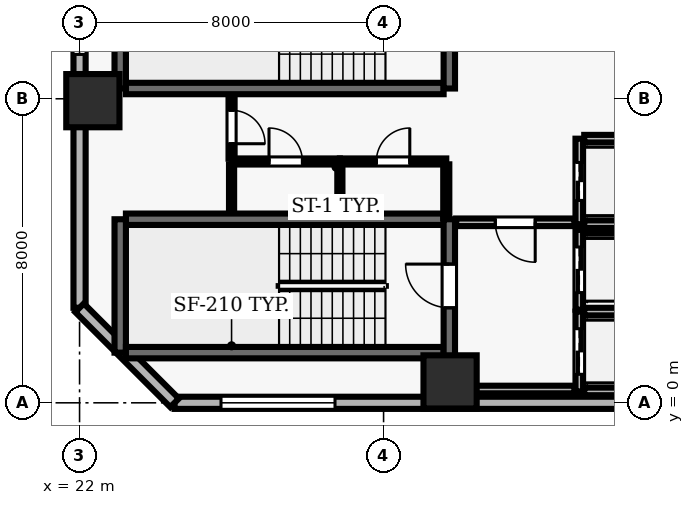
"""IFC4 building model, lengths in metres.
Left out: names, types, materials, properties, quantities, classifications, styles, units other than length and angle.
Written with IfcOpenShell. Run it as: python <this file> out.ifc"""

import sys

from ifc_helpers import new_model, si_unit, direction, frame, frame_2d, origin, origin_2d, place, context, subcontext, project, spatial, rectangle, extrude, element, fill, save


model = new_model("IFC4")
c1 = context("Model", 3, precision=1e-05, world=origin(), true_north=direction((0.0, 1.0)))
c2 = subcontext(c1, "Body", "Model", "MODEL_VIEW")
j1 = project(units=[si_unit("LENGTHUNIT", "METRE"), si_unit("PLANEANGLEUNIT", "RADIAN")], contexts=[c1])
p1 = place(None, origin())
s1 = spatial("IfcSite", under=j1, at=p1, CompositionType="ELEMENT")
p2 = place(p1, origin())
s2 = spatial("IfcBuilding", under=s1, at=p2, CompositionType="ELEMENT")
p3 = place(p2, frame((0.0, 0.0, 50.5)))
s3 = spatial("IfcBuildingStorey", under=s2, at=p3, CompositionType="ELEMENT", Elevation=50.5)
for number, where, z_axis, x_axis in (
    (1, (31.75, 0.55, 0.0), (0.0, 0.0, 1.0), (1.0, 0.0, 0.0)),
    (2, (22.35, 7.95, 0.0), (0.0, 0.0, 1.0), (1.0, 0.0, 0.0)),
):
    element("IfcColumn", number, at=place(p3, frame(where, z_axis=z_axis, x_axis=x_axis)), inside=s3, PredefinedType="COLUMN", context=c2, shape_type="SweptSolid", body=[
        extrude(rectangle(XDim=1.4, YDim=1.4, at=origin_2d()), origin(), (0.0, 0.0, 1.0), 3.9),
    ])
p4 = place(p3, frame((24.5, 0.0, 0.0), z_axis=(0.0, 0.0, 1.0), x_axis=(1.0, 0.0, 0.0)))
e3 = element("IfcWall", 3, at=p4, inside=s3, PredefinedType="SOLIDWALL", context=c2, shape_type="SweptSolid", body=[
    extrude(rectangle(XDim=49.0, YDim=0.32, at=frame_2d((24.5, 0.0))), origin(), (0.0, 0.0, 1.0), 3.69),
])
p5 = place(p4, frame((1.222, 0.0, 0.9)))
e4 = element("IfcOpeningElement", 4, at=p5, cuts=e3, PredefinedType="OPENING", context=c2, shape_type="SweptSolid", body=[
    extrude(rectangle(XDim=3.0, YDim=2.2, at=frame_2d((1.5, 1.1))), frame((0.0, 0.17, 0.0), z_axis=(0.0, -1.0, 0.0), x_axis=(1.0, 0.0, 0.0)), (0.0, 0.0, 1.0), 0.34),
])
p6 = place(p4, frame((17.556, 0.0, 0.9)))
e5 = element("IfcOpeningElement", 5, at=p6, cuts=e3, PredefinedType="OPENING", context=c2, shape_type="SweptSolid", body=[
    extrude(rectangle(XDim=3.0, YDim=2.2, at=frame_2d((1.5, 1.1))), frame((0.0, 0.17, 0.0), z_axis=(0.0, -1.0, 0.0), x_axis=(1.0, 0.0, 0.0)), (0.0, 0.0, 1.0), 0.34),
])
p7 = place(p4, frame((28.444, 0.0, 0.9)))
e6 = element("IfcOpeningElement", 6, at=p7, cuts=e3, PredefinedType="OPENING", context=c2, shape_type="SweptSolid", body=[
    extrude(rectangle(XDim=3.0, YDim=2.2, at=frame_2d((1.5, 1.1))), frame((0.0, 0.17, 0.0), z_axis=(0.0, -1.0, 0.0), x_axis=(1.0, 0.0, 0.0)), (0.0, 0.0, 1.0), 0.34),
])
p8 = place(p4, frame((39.333, 0.0, 0.9)))
e7 = element("IfcOpeningElement", 7, at=p8, cuts=e3, PredefinedType="OPENING", context=c2, shape_type="SweptSolid", body=[
    extrude(rectangle(XDim=3.0, YDim=2.2, at=frame_2d((1.5, 1.1))), frame((0.0, 0.17, 0.0), z_axis=(0.0, -1.0, 0.0), x_axis=(1.0, 0.0, 0.0)), (0.0, 0.0, 1.0), 0.34),
])
p9 = place(p4, frame((44.778, 0.0, 0.9)))
e8 = element("IfcOpeningElement", 8, at=p9, cuts=e3, PredefinedType="OPENING", context=c2, shape_type="SweptSolid", body=[
    extrude(rectangle(XDim=3.0, YDim=2.2, at=frame_2d((1.5, 1.1))), frame((0.0, 0.17, 0.0), z_axis=(0.0, -1.0, 0.0), x_axis=(1.0, 0.0, 0.0)), (0.0, 0.0, 1.0), 0.34),
])
p10 = place(p3, frame((22.0, 51.5, 0.0), z_axis=(0.0, 0.0, 1.0), x_axis=(0.0, -1.0, 0.0)))
e9 = element("IfcWall", 9, at=p10, inside=s3, PredefinedType="SOLIDWALL", context=c2, shape_type="SweptSolid", body=[
    extrude(rectangle(XDim=49.0, YDim=0.32, at=frame_2d((24.5, 0.0))), origin(), (0.0, 0.0, 1.0), 3.69),
])
p11 = place(p10, frame((17.8, 0.0, 0.0)))
e10 = element("IfcOpeningElement", 10, at=p11, cuts=e9, PredefinedType="OPENING", context=c2, shape_type="SweptSolid", body=[
    extrude(rectangle(XDim=1.0, YDim=2.2, at=frame_2d((0.5, 1.1))), frame((0.0, 0.17, 0.0), z_axis=(0.0, -1.0, 0.0), x_axis=(1.0, 0.0, 0.0)), (0.0, 0.0, 1.0), 0.34),
])
p12 = place(p10, frame((1.222, 0.0, 0.9)))
e11 = element("IfcOpeningElement", 11, at=p12, cuts=e9, PredefinedType="OPENING", context=c2, shape_type="SweptSolid", body=[
    extrude(rectangle(XDim=3.0, YDim=2.2, at=frame_2d((1.5, 1.1))), frame((0.0, 0.17, 0.0), z_axis=(0.0, -1.0, 0.0), x_axis=(1.0, 0.0, 0.0)), (0.0, 0.0, 1.0), 0.34),
])
p13 = place(p10, frame((6.667, 0.0, 0.9)))
e12 = element("IfcOpeningElement", 12, at=p13, cuts=e9, PredefinedType="OPENING", context=c2, shape_type="SweptSolid", body=[
    extrude(rectangle(XDim=3.0, YDim=2.2, at=frame_2d((1.5, 1.1))), frame((0.0, 0.17, 0.0), z_axis=(0.0, -1.0, 0.0), x_axis=(1.0, 0.0, 0.0)), (0.0, 0.0, 1.0), 0.34),
])
p14 = place(p10, frame((39.333, 0.0, 0.9)))
e13 = element("IfcOpeningElement", 13, at=p14, cuts=e9, PredefinedType="OPENING", context=c2, shape_type="SweptSolid", body=[
    extrude(rectangle(XDim=3.0, YDim=2.2, at=frame_2d((1.5, 1.1))), frame((0.0, 0.17, 0.0), z_axis=(0.0, -1.0, 0.0), x_axis=(1.0, 0.0, 0.0)), (0.0, 0.0, 1.0), 0.34),
])
p15 = place(p3, frame((22.0, 2.5, 0.0), z_axis=(0.0, 0.0, 1.0), x_axis=(0.707106781187, -0.707106781187, 0.0)))
e14 = element("IfcWall", 14, at=p15, inside=s3, PredefinedType="SOLIDWALL", context=c2, shape_type="SweptSolid", body=[
    extrude(rectangle(XDim=3.536, YDim=0.32, at=frame_2d((1.768, 0.0))), origin(), (0.0, 0.0, 1.0), 3.69),
])
p16 = place(p3, frame((31.58, 4.83, 0.0), z_axis=(0.0, 0.0, 1.0), x_axis=(-1.0, 0.0, 0.0)))
e15 = element("IfcWall", 15, at=p16, inside=s3, PredefinedType="SHEAR", context=c2, shape_type="SweptSolid", body=[
    extrude(rectangle(XDim=8.36, YDim=0.3, at=frame_2d((4.18, 0.0))), origin(), (0.0, 0.0, 1.0), 3.69),
])
p17 = place(p3, frame((23.07, 4.83, 0.0), z_axis=(0.0, 0.0, 1.0), x_axis=(0.0, -1.0, 0.0)))
e16 = element("IfcWall", 16, at=p17, inside=s3, PredefinedType="SHEAR", context=c2, shape_type="SweptSolid", body=[
    extrude(rectangle(XDim=3.51, YDim=0.3, at=frame_2d((1.755, 0.0))), origin(), (0.0, 0.0, 1.0), 3.69),
])
p18 = place(p3, frame((23.22, 1.32, 0.0), z_axis=(0.0, 0.0, 1.0), x_axis=(1.0, 0.0, 0.0)))
e17 = element("IfcWall", 17, at=p18, inside=s3, PredefinedType="SHEAR", context=c2, shape_type="SweptSolid", body=[
    extrude(rectangle(XDim=8.36, YDim=0.3, at=frame_2d((4.18, 0.0))), origin(), (0.0, 0.0, 1.0), 3.69),
])
p19 = place(p3, frame((31.73, 0.96, 0.0), z_axis=(0.0, 0.0, 1.0), x_axis=(0.0, 1.0, 0.0)))
e18 = element("IfcWall", 18, at=p19, inside=s3, PredefinedType="SHEAR", context=c2, shape_type="SweptSolid", body=[
    extrude(rectangle(XDim=3.87, YDim=0.3, at=frame_2d((1.935, 0.0))), origin(), (0.0, 0.0, 1.0), 3.69),
])
p20 = place(p19, frame((1.54, 0.0, 0.0)))
e19 = element("IfcOpeningElement", 19, at=p20, cuts=e18, PredefinedType="OPENING", context=c2, shape_type="SweptSolid", body=[
    extrude(rectangle(XDim=1.15, YDim=2.15, at=frame_2d((0.575, 1.075))), frame((0.0, 0.16, 0.0), z_axis=(0.0, -1.0, 0.0), x_axis=(1.0, 0.0, 0.0)), (0.0, 0.0, 1.0), 0.32),
])
p21 = place(p3, frame((23.07, 11.78, 0.0), z_axis=(0.0, 0.0, 1.0), x_axis=(0.0, -1.0, 0.0)))
e20 = element("IfcWall", 20, at=p21, inside=s3, PredefinedType="SHEAR", context=c2, shape_type="SweptSolid", body=[
    extrude(rectangle(XDim=3.51, YDim=0.3, at=frame_2d((1.755, 0.0))), origin(), (0.0, 0.0, 1.0), 3.69),
])
p22 = place(p3, frame((23.22, 8.27, 0.0), z_axis=(0.0, 0.0, 1.0), x_axis=(1.0, 0.0, 0.0)))
e21 = element("IfcWall", 21, at=p22, inside=s3, PredefinedType="SHEAR", context=c2, shape_type="SweptSolid", body=[
    extrude(rectangle(XDim=8.36, YDim=0.3, at=frame_2d((4.18, 0.0))), origin(), (0.0, 0.0, 1.0), 3.69),
])
p23 = place(p3, frame((31.73, 8.27, 0.0), z_axis=(0.0, 0.0, 1.0), x_axis=(0.0, 1.0, 0.0)))
e22 = element("IfcWall", 22, at=p23, inside=s3, PredefinedType="SHEAR", context=c2, shape_type="SweptSolid", body=[
    extrude(rectangle(XDim=3.51, YDim=0.3, at=frame_2d((1.755, 0.0))), origin(), (0.0, 0.0, 1.0), 3.69),
])
p24 = place(p23, frame((1.18, 0.0, 0.0)))
e23 = element("IfcOpeningElement", 23, at=p24, cuts=e22, PredefinedType="OPENING", context=c2, shape_type="SweptSolid", body=[
    extrude(rectangle(XDim=1.15, YDim=2.15, at=frame_2d((0.575, 1.075))), frame((0.0, 0.16, 0.0), z_axis=(0.0, -1.0, 0.0), x_axis=(1.0, 0.0, 0.0)), (0.0, 0.0, 1.0), 0.32),
])
p25 = place(p3, frame((35.15, 2.4, 0.0), z_axis=(0.0, 0.0, 1.0), x_axis=(0.0, -1.0, 0.0)))
e24 = element("IfcWall", 24, at=p25, inside=s3, PredefinedType="SOLIDWALL", context=c2, shape_type="SweptSolid", body=[
    extrude(rectangle(XDim=2.1, YDim=0.2, at=frame_2d((1.05, 0.0))), origin(), (0.0, 0.0, 1.0), 3.69),
])
p26 = place(p25, frame((0.45, 0.0, 0.0)))
e25 = element("IfcOpeningElement", 25, at=p26, cuts=e24, PredefinedType="OPENING", context=c2, shape_type="SweptSolid", body=[
    extrude(rectangle(XDim=1.2, YDim=2.15, at=frame_2d((0.6, 1.075))), frame((0.0, 0.11, 0.0), z_axis=(0.0, -1.0, 0.0), x_axis=(1.0, 0.0, 0.0)), (0.0, 0.0, 1.0), 0.22),
])
for number, where, z_axis, x_axis in (
    (26, (35.28, 0.3, 0.0), (0.0, 0.0, 1.0), (1.0, 0.0, 0.0)),
    (27, (37.42, 2.4, 0.0), (0.0, 0.0, 1.0), (-1.0, 0.0, 0.0)),
):
    element("IfcWall", number, at=place(p3, frame(where, z_axis=z_axis, x_axis=x_axis)), inside=s3, PredefinedType="SOLIDWALL", context=c2, shape_type="SweptSolid", body=[
        extrude(rectangle(XDim=2.14, YDim=0.2, at=frame_2d((1.07, 0.0))), origin(), (0.0, 0.0, 1.0), 3.69),
    ])
p27 = place(p3, frame((35.15, 4.55, 0.0), z_axis=(0.0, 0.0, 1.0), x_axis=(0.0, -1.0, 0.0)))
e28 = element("IfcWall", 28, at=p27, inside=s3, PredefinedType="SOLIDWALL", context=c2, shape_type="SweptSolid", body=[
    extrude(rectangle(XDim=2.1, YDim=0.2, at=frame_2d((1.05, 0.0))), origin(), (0.0, 0.0, 1.0), 3.69),
])
p28 = place(p27, frame((0.45, 0.0, 0.0)))
e29 = element("IfcOpeningElement", 29, at=p28, cuts=e28, PredefinedType="OPENING", context=c2, shape_type="SweptSolid", body=[
    extrude(rectangle(XDim=1.2, YDim=2.15, at=frame_2d((0.6, 1.075))), frame((0.0, 0.11, 0.0), z_axis=(0.0, -1.0, 0.0), x_axis=(1.0, 0.0, 0.0)), (0.0, 0.0, 1.0), 0.22),
])
p29 = place(p3, frame((37.42, 4.55, 0.0), z_axis=(0.0, 0.0, 1.0), x_axis=(-1.0, 0.0, 0.0)))
e30 = element("IfcWall", 30, at=p29, inside=s3, PredefinedType="SOLIDWALL", context=c2, shape_type="SweptSolid", body=[
    extrude(rectangle(XDim=2.14, YDim=0.2, at=frame_2d((1.07, 0.0))), origin(), (0.0, 0.0, 1.0), 3.69),
])
p30 = place(p3, frame((35.15, 6.95, 0.0), z_axis=(0.0, 0.0, 1.0), x_axis=(0.0, -1.0, 0.0)))
e31 = element("IfcWall", 31, at=p30, inside=s3, PredefinedType="SOLIDWALL", context=c2, shape_type="SweptSolid", body=[
    extrude(rectangle(XDim=2.25, YDim=0.2, at=frame_2d((1.125, 0.0))), origin(), (0.0, 0.0, 1.0), 3.69),
])
p31 = place(p30, frame((0.625, 0.0, 0.0)))
e32 = element("IfcOpeningElement", 32, at=p31, cuts=e31, PredefinedType="OPENING", context=c2, shape_type="SweptSolid", body=[
    extrude(rectangle(XDim=1.0, YDim=2.1, at=frame_2d((0.5, 1.05))), frame((0.0, 0.11, 0.0), z_axis=(0.0, -1.0, 0.0), x_axis=(1.0, 0.0, 0.0)), (0.0, 0.0, 1.0), 0.22),
])
for number, where, z_axis, x_axis in (
    (33, (35.28, 4.7, 0.0), (0.0, 0.0, 1.0), (1.0, 0.0, 0.0)),
    (34, (37.42, 6.95, 0.0), (0.0, 0.0, 1.0), (-1.0, 0.0, 0.0)),
):
    element("IfcWall", number, at=place(p3, frame(where, z_axis=z_axis, x_axis=x_axis)), inside=s3, PredefinedType="SOLIDWALL", context=c2, shape_type="SweptSolid", body=[
        extrude(rectangle(XDim=2.14, YDim=0.2, at=frame_2d((1.07, 0.0))), origin(), (0.0, 0.0, 1.0), 3.69),
    ])
p32 = place(p3, frame((26.0, 6.35, 0.0), z_axis=(0.0, 0.0, 1.0), x_axis=(1.0, 0.0, 0.0)))
e35 = element("IfcWall", 35, at=p32, inside=s3, PredefinedType="PARTITIONING", context=c2, shape_type="SweptSolid", body=[
    extrude(rectangle(XDim=2.85, YDim=0.16, at=frame_2d((1.425, 0.0))), origin(), (0.0, 0.0, 1.0), 3.69),
])
p33 = place(p32, frame((0.985, 0.0, 0.0)))
e36 = element("IfcOpeningElement", 36, at=p33, cuts=e35, PredefinedType="OPENING", context=c2, shape_type="SweptSolid", body=[
    extrude(rectangle(XDim=0.88, YDim=2.1, at=frame_2d((0.44, 1.05))), frame((0.0, 0.09, 0.0), z_axis=(0.0, -1.0, 0.0), x_axis=(1.0, 0.0, 0.0)), (0.0, 0.0, 1.0), 0.18),
])
p34 = place(p3, frame((28.85, 6.35, 0.0), z_axis=(0.0, 0.0, 1.0), x_axis=(1.0, 0.0, 0.0)))
e37 = element("IfcWall", 37, at=p34, inside=s3, PredefinedType="PARTITIONING", context=c2, shape_type="SweptSolid", body=[
    extrude(rectangle(XDim=2.8, YDim=0.16, at=frame_2d((1.4, 0.0))), origin(), (0.0, 0.0, 1.0), 3.69),
])
p35 = place(p34, frame((0.96, 0.0, 0.0)))
e38 = element("IfcOpeningElement", 38, at=p35, cuts=e37, PredefinedType="OPENING", context=c2, shape_type="SweptSolid", body=[
    extrude(rectangle(XDim=0.88, YDim=2.1, at=frame_2d((0.44, 1.05))), frame((0.0, 0.09, 0.0), z_axis=(0.0, -1.0, 0.0), x_axis=(1.0, 0.0, 0.0)), (0.0, 0.0, 1.0), 0.18),
])
p36 = place(p3, frame((31.65, 0.35, 0.0), z_axis=(0.0, 0.0, 1.0), x_axis=(1.0, 0.0, 0.0)))
e39 = element("IfcWall", 39, at=p36, inside=s3, PredefinedType="SOLIDWALL", context=c2, shape_type="SweptSolid", body=[
    extrude(rectangle(XDim=3.37, YDim=0.2, at=frame_2d((1.685, 0.0))), origin(), (0.0, 0.0, 1.0), 3.69),
])
p37 = place(p3, frame((35.02, 4.75, 0.0), z_axis=(0.0, 0.0, 1.0), x_axis=(-1.0, 0.0, 0.0)))
e40 = element("IfcWall", 40, at=p37, inside=s3, PredefinedType="SOLIDWALL", context=c2, shape_type="SweptSolid", body=[
    extrude(rectangle(XDim=3.11, YDim=0.2, at=frame_2d((1.555, 0.0))), origin(), (0.0, 0.0, 1.0), 3.69),
])
p38 = place(p37, frame((1.03, 0.0, 0.0)))
e41 = element("IfcOpeningElement", 41, at=p38, cuts=e40, PredefinedType="OPENING", context=c2, shape_type="SweptSolid", body=[
    extrude(rectangle(XDim=1.05, YDim=2.15, at=frame_2d((0.525, 1.075))), frame((0.0, 0.11, 0.0), z_axis=(0.0, -1.0, 0.0), x_axis=(1.0, 0.0, 0.0)), (0.0, 0.0, 1.0), 0.22),
])
p39 = place(p3, frame((26.0, 5.01, 0.0), z_axis=(0.0, 0.0, 1.0), x_axis=(0.0, 1.0, 0.0)))
e42 = element("IfcWall", 42, at=p39, inside=s3, PredefinedType="PARTITIONING", context=c2, shape_type="SweptSolid", body=[
    extrude(rectangle(XDim=1.265, YDim=0.135, at=frame_2d((0.632, 0.0))), origin(), (0.0, 0.0, 1.0), 3.69),
])
p40 = place(p3, frame((26.0, 8.09, 0.0), z_axis=(0.0, 0.0, 1.0), x_axis=(0.0, -1.0, 0.0)))
e43 = element("IfcWall", 43, at=p40, inside=s3, PredefinedType="PARTITIONING", context=c2, shape_type="SweptSolid", body=[
    extrude(rectangle(XDim=1.665, YDim=0.16, at=frame_2d((0.833, 0.0))), origin(), (0.0, 0.0, 1.0), 3.69),
])
p41 = place(p40, frame((0.393, 0.0, 0.0)))
e44 = element("IfcOpeningElement", 44, at=p41, cuts=e43, PredefinedType="OPENING", context=c2, shape_type="SweptSolid", body=[
    extrude(rectangle(XDim=0.88, YDim=2.1, at=frame_2d((0.44, 1.05))), frame((0.0, 0.09, 0.0), z_axis=(0.0, -1.0, 0.0), x_axis=(1.0, 0.0, 0.0)), (0.0, 0.0, 1.0), 0.18),
])
p42 = place(p3, frame((28.85, 5.01, 0.0), z_axis=(0.0, 0.0, 1.0), x_axis=(0.0, 1.0, 0.0)))
e45 = element("IfcWall", 45, at=p42, inside=s3, PredefinedType="PARTITIONING", context=c2, shape_type="SweptSolid", body=[
    extrude(rectangle(XDim=1.265, YDim=0.135, at=frame_2d((0.632, 0.0))), origin(), (0.0, 0.0, 1.0), 3.69),
])
p43 = place(p3, frame((31.65, 4.86, 0.0), z_axis=(0.0, 0.0, 1.0), x_axis=(0.0, 1.0, 0.0)))
e46 = element("IfcWall", 46, at=p43, inside=s3, PredefinedType="PARTITIONING", context=c2, shape_type="SweptSolid", body=[
    extrude(rectangle(XDim=1.415, YDim=0.16, at=frame_2d((0.708, 0.0))), origin(), (0.0, 0.0, 1.0), 3.69),
])
p44 = place(p5, origin())
e47 = element("IfcWindow", 47, at=p44, inside=s3, PartitioningType="SINGLE_PANEL", PredefinedType="WINDOW", context=c2, shape_type="SweptSolid", body=[
    extrude(rectangle(XDim=3.0, YDim=2.2, at=frame_2d((1.5, 1.1))), frame((0.0, 0.03, 0.0), z_axis=(0.0, -1.0, 0.0), x_axis=(1.0, 0.0, 0.0)), (0.0, 0.0, 1.0), 0.06),
])
fill(e4, e47)
p45 = place(p14, origin())
e48 = element("IfcWindow", 48, at=p45, inside=s3, PartitioningType="SINGLE_PANEL", PredefinedType="WINDOW", context=c2, shape_type="SweptSolid", body=[
    extrude(rectangle(XDim=3.0, YDim=2.2, at=frame_2d((1.5, 1.1))), frame((0.0, 0.03, 0.0), z_axis=(0.0, -1.0, 0.0), x_axis=(1.0, 0.0, 0.0)), (0.0, 0.0, 1.0), 0.06),
])
fill(e13, e48)
p46 = place(p20, origin())
e49 = element("IfcDoor", 49, at=p46, inside=s3, OperationType="SINGLE_SWING_RIGHT", PredefinedType="DOOR", context=c2, shape_type="SweptSolid", body=[
    extrude(rectangle(XDim=1.15, YDim=2.15, at=frame_2d((0.575, 1.075))), frame((0.0, 0.025, 0.0), z_axis=(0.0, -1.0, 0.0), x_axis=(1.0, 0.0, 0.0)), (0.0, 0.0, 1.0), 0.05),
])
fill(e19, e49)
p47 = place(p26, origin())
e50 = element("IfcDoor", 50, at=p47, inside=s3, OperationType="DOUBLE_DOOR_SLIDING", PredefinedType="DOOR", context=c2, shape_type="SweptSolid", body=[
    extrude(rectangle(XDim=1.2, YDim=2.15, at=frame_2d((0.6, 1.075))), frame((0.0, 0.025, 0.0), z_axis=(0.0, -1.0, 0.0), x_axis=(1.0, 0.0, 0.0)), (0.0, 0.0, 1.0), 0.05),
])
fill(e25, e50)
p48 = place(p28, origin())
e51 = element("IfcDoor", 51, at=p48, inside=s3, OperationType="DOUBLE_DOOR_SLIDING", PredefinedType="DOOR", context=c2, shape_type="SweptSolid", body=[
    extrude(rectangle(XDim=1.2, YDim=2.15, at=frame_2d((0.6, 1.075))), frame((0.0, 0.025, 0.0), z_axis=(0.0, -1.0, 0.0), x_axis=(1.0, 0.0, 0.0)), (0.0, 0.0, 1.0), 0.05),
])
fill(e29, e51)
p49 = place(p31, origin())
e52 = element("IfcDoor", 52, at=p49, inside=s3, OperationType="DOUBLE_DOOR_SLIDING", PredefinedType="DOOR", context=c2, shape_type="SweptSolid", body=[
    extrude(rectangle(XDim=1.0, YDim=2.1, at=frame_2d((0.5, 1.05))), frame((0.0, 0.025, 0.0), z_axis=(0.0, -1.0, 0.0), x_axis=(1.0, 0.0, 0.0)), (0.0, 0.0, 1.0), 0.05),
])
fill(e32, e52)
p50 = place(p38, origin())
e53 = element("IfcDoor", 53, at=p50, inside=s3, OperationType="SINGLE_SWING_LEFT", PredefinedType="DOOR", context=c2, shape_type="SweptSolid", body=[
    extrude(rectangle(XDim=1.05, YDim=2.15, at=frame_2d((0.525, 1.075))), frame((0.0, 0.025, 0.0), z_axis=(0.0, -1.0, 0.0), x_axis=(1.0, 0.0, 0.0)), (0.0, 0.0, 1.0), 0.05),
])
fill(e41, e53)
p51 = place(p41, origin())
e54 = element("IfcDoor", 54, at=p51, inside=s3, OperationType="SINGLE_SWING_RIGHT", PredefinedType="DOOR", context=c2, shape_type="SweptSolid", body=[
    extrude(rectangle(XDim=0.88, YDim=2.1, at=frame_2d((0.44, 1.05))), frame((0.0, 0.025, 0.0), z_axis=(0.0, -1.0, 0.0), x_axis=(1.0, 0.0, 0.0)), (0.0, 0.0, 1.0), 0.05),
])
fill(e44, e54)
p52 = place(p33, origin())
e55 = element("IfcDoor", 55, at=p52, inside=s3, OperationType="SINGLE_SWING_LEFT", PredefinedType="DOOR", context=c2, shape_type="SweptSolid", body=[
    extrude(rectangle(XDim=0.88, YDim=2.1, at=frame_2d((0.44, 1.05))), frame((0.0, 0.025, 0.0), z_axis=(0.0, -1.0, 0.0), x_axis=(1.0, 0.0, 0.0)), (0.0, 0.0, 1.0), 0.05),
])
fill(e36, e55)
p53 = place(p35, origin())
e56 = element("IfcDoor", 56, at=p53, inside=s3, OperationType="SINGLE_SWING_RIGHT", PredefinedType="DOOR", context=c2, shape_type="SweptSolid", body=[
    extrude(rectangle(XDim=0.88, YDim=2.1, at=frame_2d((0.44, 1.05))), frame((0.0, 0.025, 0.0), z_axis=(0.0, -1.0, 0.0), x_axis=(1.0, 0.0, 0.0)), (0.0, 0.0, 1.0), 0.05),
])
fill(e38, e56)
save(model, sys.argv[1])
